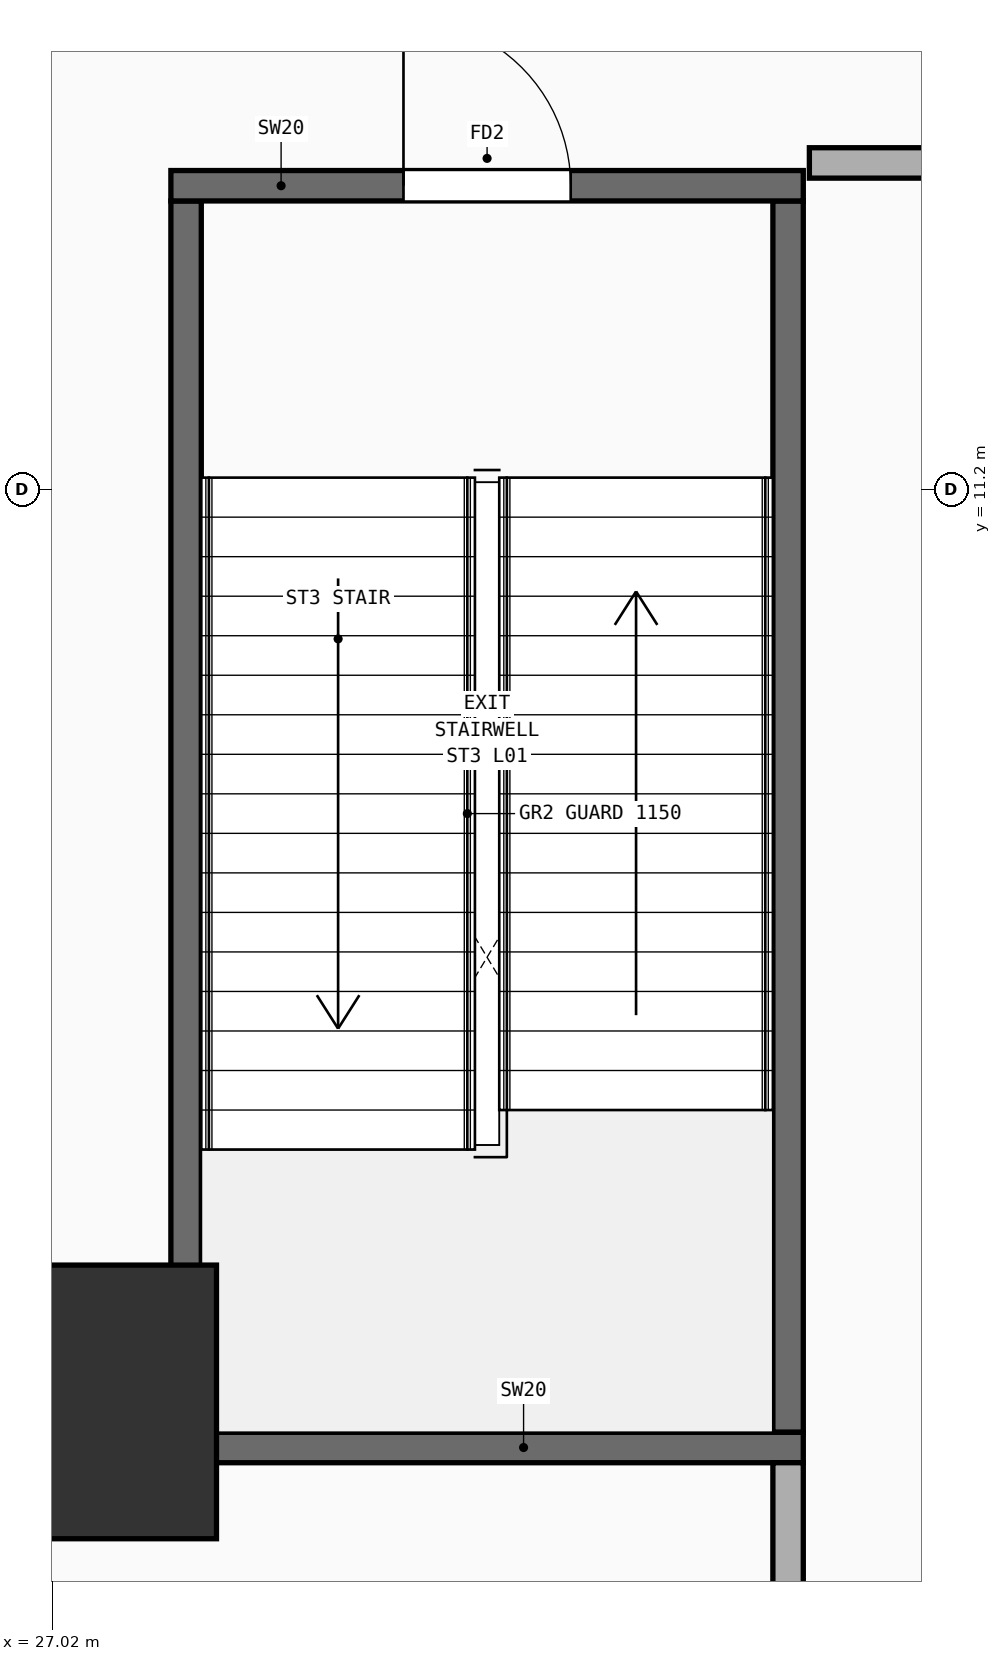
"""IFC4 building model, lengths in metres.
Left out: names, types, materials, properties, quantities, classifications, styles, units other than length and angle.
Written with IfcOpenShell. Run it as: python <this file> out.ifc"""

import sys

from ifc_helpers import new_model, si_unit, direction, frame, frame_2d, origin, origin_2d, place, context, subcontext, project, spatial, rectangle, extrude, element, fill, save


model = new_model("IFC4")
c1 = context("Model", 3, precision=1e-05, world=origin(), true_north=direction((0.0, 1.0)))
c2 = subcontext(c1, "Body", "Model", "MODEL_VIEW")
j1 = project(units=[si_unit("LENGTHUNIT", "METRE"), si_unit("PLANEANGLEUNIT", "RADIAN")], contexts=[c1])
p1 = place(None, origin())
s1 = spatial("IfcSite", under=j1, at=p1, CompositionType="ELEMENT")
p2 = place(p1, origin())
s2 = spatial("IfcBuilding", under=s1, at=p2, CompositionType="ELEMENT")
p3 = place(p2, origin())
s3 = spatial("IfcBuildingStorey", under=s2, at=p3, CompositionType="ELEMENT", Elevation=0.0)
p4 = place(p3, frame((27.2, 5.2, 0.0), z_axis=(0.0, 0.0, 1.0), x_axis=(1.0, 0.0, 0.0)))
e1 = element("IfcColumn", 1, at=p4, inside=s3, PredefinedType="COLUMN", context=c2, shape_type="SweptSolid", body=[
    extrude(rectangle(XDim=1.8, YDim=1.8, at=origin_2d()), origin(), (0.0, 0.0, 1.0), 5.26),
])
for number, where, z_axis, x_axis in (
    (2, (27.9, 5.0, 0.0), (0.0, 0.0, 1.0), (0.0, 1.0, 0.0)),
    (3, (31.86, 5.0, 0.0), (0.0, 0.0, 1.0), (0.0, 1.0, 0.0)),
):
    element("IfcWall", number, at=place(p3, frame(where, z_axis=z_axis, x_axis=x_axis)), inside=s3, PredefinedType="SHEAR", context=c2, shape_type="SweptSolid", body=[
        extrude(rectangle(XDim=8.1, YDim=0.2, at=frame_2d((4.05, 0.0))), origin(), (0.0, 0.0, 1.0), 5.26),
    ])
p5 = place(p3, frame((27.8, 4.9, 0.0), z_axis=(0.0, 0.0, 1.0), x_axis=(1.0, 0.0, 0.0)))
e4 = element("IfcWall", 4, at=p5, inside=s3, PredefinedType="SHEAR", context=c2, shape_type="SweptSolid", body=[
    extrude(rectangle(XDim=4.16, YDim=0.2, at=frame_2d((2.08, 0.0))), origin(), (0.0, 0.0, 1.0), 5.26),
])
p6 = place(p3, frame((27.8, 13.2, 0.0), z_axis=(0.0, 0.0, 1.0), x_axis=(1.0, 0.0, 0.0)))
e5 = element("IfcWall", 5, at=p6, inside=s3, PredefinedType="SHEAR", context=c2, shape_type="SweptSolid", body=[
    extrude(rectangle(XDim=4.16, YDim=0.2, at=frame_2d((2.08, 0.0))), origin(), (0.0, 0.0, 1.0), 5.26),
])
p7 = place(p6, frame((1.53, 0.0, 0.0)))
e6 = element("IfcOpeningElement", 6, at=p7, cuts=e5, PredefinedType="OPENING", context=c2, shape_type="SweptSolid", body=[
    extrude(rectangle(XDim=1.1, YDim=2.2, at=frame_2d((0.55, 1.1))), frame((0.0, 0.11, 0.0), z_axis=(0.0, -1.0, 0.0), x_axis=(1.0, 0.0, 0.0)), (0.0, 0.0, 1.0), 0.22),
])
p8 = place(p3, frame((32.0, 13.35, 0.0), z_axis=(0.0, 0.0, 1.0), x_axis=(1.0, 0.0, 0.0)))
e7 = element("IfcWall", 7, at=p8, inside=s3, PredefinedType="PARTITIONING", context=c2, shape_type="SweptSolid", body=[
    extrude(rectangle(XDim=11.15, YDim=0.2, at=frame_2d((5.575, 0.0))), origin(), (0.0, 0.0, 1.0), 4.76),
])
p9 = place(p8, frame((5.021, 0.0, 0.0)))
e8 = element("IfcOpeningElement", 8, at=p9, cuts=e7, PredefinedType="OPENING", context=c2, shape_type="SweptSolid", body=[
    extrude(rectangle(XDim=1.1, YDim=2.2, at=frame_2d((0.55, 1.1))), frame((0.0, 0.11, 0.0), z_axis=(0.0, -1.0, 0.0), x_axis=(1.0, 0.0, 0.0)), (0.0, 0.0, 1.0), 0.22),
])
p10 = place(p3, frame((31.86, 0.42, 0.0), z_axis=(0.0, 0.0, 1.0), x_axis=(0.0, 1.0, 0.0)))
e9 = element("IfcWall", 9, at=p10, inside=s3, PredefinedType="PARTITIONING", context=c2, shape_type="SweptSolid", body=[
    extrude(rectangle(XDim=4.38, YDim=0.2, at=frame_2d((2.19, 0.0))), origin(), (0.0, 0.0, 1.0), 5.26),
])
p11 = place(p7, frame((1.1, 0.0, 0.0), z_axis=(0.0, 0.0, 1.0), x_axis=(-1.0, 0.0, 0.0)))
e10 = element("IfcDoor", 10, at=p11, inside=s3, OperationType="SINGLE_SWING_RIGHT", PredefinedType="DOOR", context=c2, shape_type="SweptSolid", body=[
    extrude(rectangle(XDim=1.1, YDim=2.2, at=frame_2d((0.55, 1.1))), frame((0.0, 0.025, 0.0), z_axis=(0.0, -1.0, 0.0), x_axis=(1.0, 0.0, 0.0)), (0.0, 0.0, 1.0), 0.05),
])
fill(e6, e10)
save(model, sys.argv[1])
